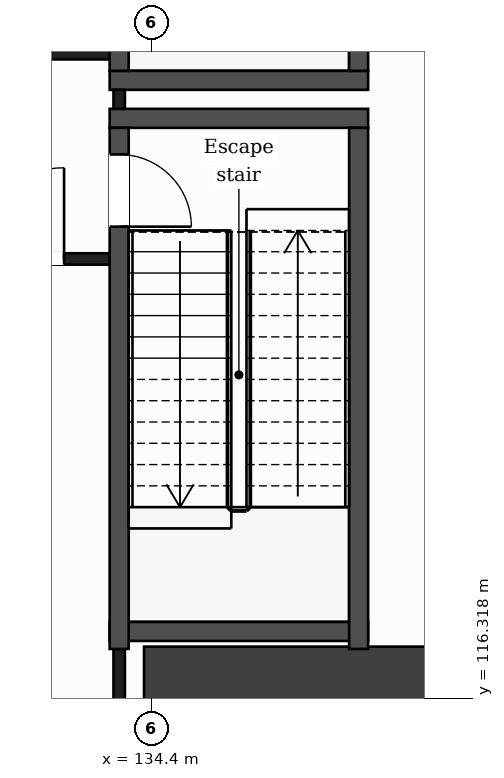
"""IFC4 building model, lengths in metres.
Left out: names, types, materials, properties, quantities, classifications, styles, units other than length and angle.
Written with IfcOpenShell. Run it as: python <this file> out.ifc"""

import sys

from ifc_helpers import new_model, si_unit, direction, frame, frame_2d, origin, place, context, subcontext, project, spatial, rectangle, extrude, element, fill, save


model = new_model("IFC4")
c1 = context("Model", 3, precision=1e-05, world=origin(), true_north=direction((0.0, 1.0)))
c2 = subcontext(c1, "Body", "Model", "MODEL_VIEW")
j1 = project(units=[si_unit("LENGTHUNIT", "METRE"), si_unit("PLANEANGLEUNIT", "RADIAN")], contexts=[c1])
p1 = place(None, origin())
s1 = spatial("IfcSite", under=j1, at=p1, CompositionType="ELEMENT")
p2 = place(p1, origin())
s2 = spatial("IfcBuilding", under=s1, at=p2, CompositionType="ELEMENT")
p3 = place(p2, frame((0.0, 0.0, 142.8)))
s3 = spatial("IfcBuildingStorey", under=s2, at=p3, CompositionType="ELEMENT", Elevation=142.8)
p4 = place(p3, frame((137.732, 131.9, 0.0), z_axis=(0.0, 0.0, 1.0), x_axis=(0.133411141623, -0.991060778808, 0.0)))
e1 = element("IfcWall", 1, at=p4, inside=s3, PredefinedType="SHEAR", context=c2, shape_type="SweptSolid", body=[
    extrude(rectangle(XDim=21.189, YDim=1.0, at=frame_2d((10.595, 0.0))), origin(), (0.0, 0.0, 1.0), 5.0),
])
p5 = place(p3, frame((134.3, 116.5, 0.0), z_axis=(0.0, 0.0, 1.0), x_axis=(1.0, 0.0, 0.0)))
e2 = element("IfcWall", 2, at=p5, inside=s3, PredefinedType="SHEAR", context=c2, shape_type="SweptSolid", body=[
    extrude(rectangle(XDim=5.077, YDim=1.0, at=frame_2d((2.539, 0.0))), origin(), (0.0, 0.0, 1.0), 5.0),
])
p6 = place(p3, frame((133.848, 117.2, 0.0), z_axis=(0.0, 0.0, 1.0), x_axis=(1.0, 0.0, 0.0)))
e3 = element("IfcWall", 3, at=p6, inside=s3, PredefinedType="PARTITIONING", context=c2, shape_type="SweptSolid", body=[
    extrude(rectangle(XDim=3.4, YDim=0.25, at=frame_2d((1.7, 0.0))), origin(), (0.0, 0.0, 1.0), 4.68),
])
p7 = place(p3, frame((131.573, 122.1, 0.0), z_axis=(0.0, 0.0, 1.0), x_axis=(1.0, 0.0, 0.0)))
e4 = element("IfcWall", 4, at=p7, inside=s3, PredefinedType="PARTITIONING", context=c2, shape_type="SweptSolid", body=[
    extrude(rectangle(XDim=2.4, YDim=0.15, at=frame_2d((1.2, 0.0))), origin(), (0.0, 0.0, 1.0), 4.68),
])
p8 = place(p7, frame((0.475, 0.0, 0.0)))
e5 = element("IfcOpeningElement", 5, at=p8, cuts=e4, PredefinedType="OPENING", context=c2, shape_type="SweptSolid", body=[
    extrude(rectangle(XDim=1.2, YDim=2.1, at=frame_2d((0.6, 1.05))), frame((0.0, 0.085, 0.0), z_axis=(0.0, -1.0, 0.0), x_axis=(1.0, 0.0, 0.0)), (0.0, 0.0, 1.0), 0.17),
])
for number, where, z_axis, x_axis in (
    (6, (133.848, 123.95, 0.0), (0.0, 0.0, 1.0), (1.0, 0.0, 0.0)),
    (7, (133.848, 124.45, 0.0), (0.0, 0.0, 1.0), (1.0, 0.0, 0.0)),
):
    element("IfcWall", number, at=place(p3, frame(where, z_axis=z_axis, x_axis=x_axis)), inside=s3, PredefinedType="PARTITIONING", context=c2, shape_type="SweptSolid", body=[
        extrude(rectangle(XDim=3.4, YDim=0.25, at=frame_2d((1.7, 0.0))), origin(), (0.0, 0.0, 1.0), 4.68),
    ])
p9 = place(p3, frame((131.649, 124.8, 0.0), z_axis=(0.0, 0.0, 1.0), x_axis=(1.0, 0.0, 0.0)))
e8 = element("IfcWall", 8, at=p9, inside=s3, PredefinedType="PARTITIONING", context=c2, shape_type="SweptSolid", body=[
    extrude(rectangle(XDim=2.449, YDim=0.15, at=frame_2d((1.225, 0.0))), origin(), (0.0, 0.0, 1.0), 4.68),
])
p10 = place(p3, frame((133.973, 116.0, 0.0), z_axis=(0.0, 0.0, 1.0), x_axis=(0.0, 1.0, 0.0)))
e9 = element("IfcWall", 9, at=p10, inside=s3, PredefinedType="PARTITIONING", context=c2, shape_type="SweptSolid", body=[
    extrude(rectangle(XDim=0.97, YDim=0.15, at=frame_2d((0.485, 0.0))), origin(), (0.0, 0.0, 1.0), 4.68),
])
p11 = place(p3, frame((133.973, 124.075, 0.0), z_axis=(0.0, 0.0, 1.0), x_axis=(0.0, 1.0, 0.0)))
e10 = element("IfcWall", 10, at=p11, inside=s3, PredefinedType="PARTITIONING", context=c2, shape_type="SweptSolid", body=[
    extrude(rectangle(XDim=0.25, YDim=0.15, at=frame_2d((0.125, 0.0))), origin(), (0.0, 0.0, 1.0), 4.68),
])
p12 = place(p3, frame((133.973, 116.97, 0.0), z_axis=(0.0, 0.0, 1.0), x_axis=(0.0, 1.0, 0.0)))
e11 = element("IfcWall", 11, at=p12, inside=s3, PredefinedType="PARTITIONING", context=c2, shape_type="SweptSolid", body=[
    extrude(rectangle(XDim=6.855, YDim=0.25, at=frame_2d((3.427, 0.0))), origin(), (0.0, 0.0, 1.0), 4.68),
])
p13 = place(p12, frame((5.555, 0.0, 0.0)))
e12 = element("IfcOpeningElement", 12, at=p13, cuts=e11, PredefinedType="OPENING", context=c2, shape_type="SweptSolid", body=[
    extrude(rectangle(XDim=0.95, YDim=2.1, at=frame_2d((0.475, 1.05))), frame((0.0, 0.135, 0.0), z_axis=(0.0, -1.0, 0.0), x_axis=(1.0, 0.0, 0.0)), (0.0, 0.0, 1.0), 0.27),
])
p14 = place(p3, frame((133.973, 124.575, 0.0), z_axis=(0.0, 0.0, 1.0), x_axis=(0.0, 1.0, 0.0)))
e13 = element("IfcWall", 13, at=p14, inside=s3, PredefinedType="PARTITIONING", context=c2, shape_type="SweptSolid", body=[
    extrude(rectangle(XDim=6.855, YDim=0.25, at=frame_2d((3.427, 0.0))), origin(), (0.0, 0.0, 1.0), 4.68),
])
p15 = place(p14, frame((5.325, 0.0, 0.0)))
e14 = element("IfcOpeningElement", 14, at=p15, cuts=e13, PredefinedType="OPENING", context=c2, shape_type="SweptSolid", body=[
    extrude(rectangle(XDim=1.0, YDim=2.1, at=frame_2d((0.5, 1.05))), frame((0.0, 0.135, 0.0), z_axis=(0.0, -1.0, 0.0), x_axis=(1.0, 0.0, 0.0)), (0.0, 0.0, 1.0), 0.27),
])
for number, where, z_axis, x_axis in (
    (15, (137.123, 116.97, 0.0), (0.0, 0.0, 1.0), (0.0, 1.0, 0.0)),
    (16, (137.123, 124.575, 0.0), (0.0, 0.0, 1.0), (0.0, 1.0, 0.0)),
):
    element("IfcWall", number, at=place(p3, frame(where, z_axis=z_axis, x_axis=x_axis)), inside=s3, PredefinedType="PARTITIONING", context=c2, shape_type="SweptSolid", body=[
        extrude(rectangle(XDim=6.855, YDim=0.25, at=frame_2d((3.427, 0.0))), origin(), (0.0, 0.0, 1.0), 4.68),
    ])
p16 = place(p8, origin())
e17 = element("IfcDoor", 17, at=p16, inside=s3, OperationType="SINGLE_SWING_RIGHT", PredefinedType="DOOR", context=c2, shape_type="SweptSolid", body=[
    extrude(rectangle(XDim=1.2, YDim=2.1, at=frame_2d((0.6, 1.05))), frame((0.0, 0.025, 0.0), z_axis=(0.0, -1.0, 0.0), x_axis=(1.0, 0.0, 0.0)), (0.0, 0.0, 1.0), 0.05),
])
fill(e5, e17)
p17 = place(p13, origin())
e18 = element("IfcDoor", 18, at=p17, inside=s3, OperationType="SINGLE_SWING_LEFT", PredefinedType="DOOR", context=c2, shape_type="SweptSolid", body=[
    extrude(rectangle(XDim=0.95, YDim=2.1, at=frame_2d((0.475, 1.05))), frame((0.0, 0.025, 0.0), z_axis=(0.0, -1.0, 0.0), x_axis=(1.0, 0.0, 0.0)), (0.0, 0.0, 1.0), 0.05),
])
fill(e12, e18)
save(model, sys.argv[1])
